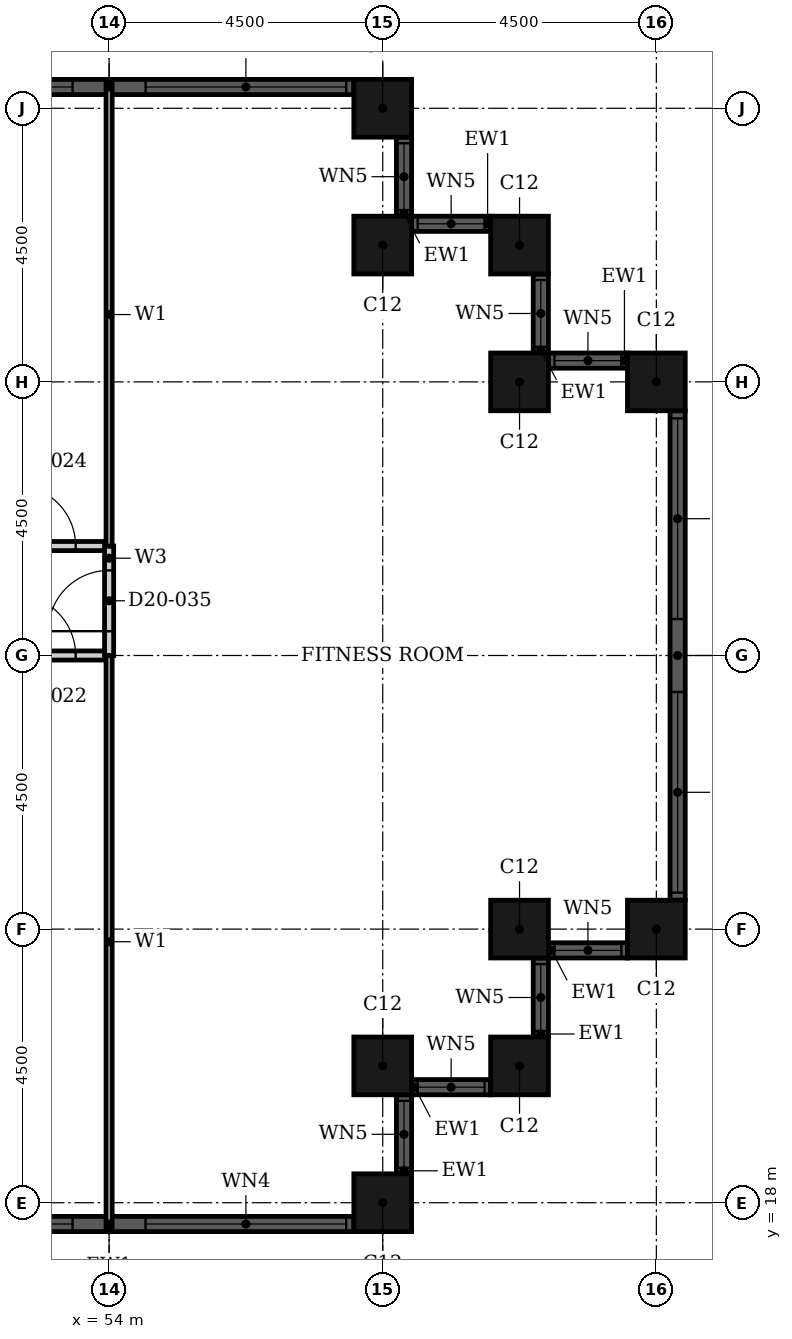
"""IFC4 building model, lengths in metres.
Left out: names, types, materials, properties, quantities, classifications, styles, units other than length and angle.
Written with IfcOpenShell. Run it as: python <this file> out.ifc"""

import sys

from ifc_helpers import new_model, si_unit, direction, frame, frame_2d, origin, origin_2d, place, context, subcontext, project, spatial, rectangle, hollow_rectangle, extrude, element, fill, save


model = new_model("IFC4")
c1 = context("Model", 3, precision=1e-05, world=origin(), true_north=direction((0.0, 1.0)))
c2 = subcontext(c1, "Body", "Model", "MODEL_VIEW")
j1 = project(units=[si_unit("LENGTHUNIT", "METRE"), si_unit("PLANEANGLEUNIT", "RADIAN")], contexts=[c1])
p1 = place(None, origin())
s1 = spatial("IfcSite", under=j1, at=p1, CompositionType="ELEMENT")
p2 = place(p1, origin())
s2 = spatial("IfcBuilding", under=s1, at=p2, CompositionType="ELEMENT")
p3 = place(p2, frame((0.0, 0.0, 85.2)))
s3 = spatial("IfcBuildingStorey", under=s2, at=p3, CompositionType="ELEMENT", Elevation=85.2)
for number, where, z_axis, x_axis in (
    (1, (58.5, 18.0, 0.0), (0.0, 0.0, 1.0), (1.0, 0.0, 0.0)),
    (2, (58.5, 20.25, 0.0), (0.0, 0.0, 1.0), (1.0, 0.0, 0.0)),
    (3, (60.75, 20.25, 0.0), (0.0, 0.0, 1.0), (1.0, 0.0, 0.0)),
    (4, (60.75, 22.5, 0.0), (0.0, 0.0, 1.0), (1.0, 0.0, 0.0)),
    (5, (63.0, 22.5, 0.0), (0.0, 0.0, 1.0), (1.0, 0.0, 0.0)),
    (6, (63.0, 31.5, 0.0), (0.0, 0.0, 1.0), (1.0, 0.0, 0.0)),
    (7, (60.75, 31.5, 0.0), (0.0, 0.0, 1.0), (1.0, 0.0, 0.0)),
    (8, (60.75, 33.75, 0.0), (0.0, 0.0, 1.0), (1.0, 0.0, 0.0)),
    (9, (58.5, 33.75, 0.0), (0.0, 0.0, 1.0), (1.0, 0.0, 0.0)),
    (10, (58.5, 36.0, 0.0), (0.0, 0.0, 1.0), (1.0, 0.0, 0.0)),
):
    element("IfcColumn", number, at=place(p3, frame(where, z_axis=z_axis, x_axis=x_axis)), inside=s3, PredefinedType="COLUMN", context=c2, shape_type="SweptSolid", body=[
        extrude(hollow_rectangle(XDim=0.95, YDim=0.95, WallThickness=0.03, at=origin_2d()), origin(), (0.0, 0.0, 1.0), 3.6),
    ])
p4 = place(p3, frame((49.975, 17.65, 0.0), z_axis=(0.0, 0.0, 1.0), x_axis=(1.0, 0.0, 0.0)))
e11 = element("IfcWall", 11, at=p4, inside=s3, PredefinedType="SOLIDWALL", context=c2, shape_type="SweptSolid", body=[
    extrude(rectangle(XDim=8.05, YDim=0.25, at=frame_2d((4.025, 0.0))), origin(), (0.0, 0.0, 1.0), 3.6),
])
p5 = place(p4, frame((0.125, 0.0, 0.9)))
e12 = element("IfcOpeningElement", 12, at=p5, cuts=e11, PredefinedType="OPENING", context=c2, shape_type="SweptSolid", body=[
    extrude(rectangle(XDim=3.3, YDim=2.08, at=frame_2d((1.65, 1.04))), frame((0.0, 0.135, 0.0), z_axis=(0.0, -1.0, 0.0), x_axis=(1.0, 0.0, 0.0)), (0.0, 0.0, 1.0), 0.27),
])
p6 = place(p4, frame((4.625, 0.0, 0.9)))
e13 = element("IfcOpeningElement", 13, at=p6, cuts=e11, PredefinedType="OPENING", context=c2, shape_type="SweptSolid", body=[
    extrude(rectangle(XDim=3.3, YDim=2.08, at=frame_2d((1.65, 1.04))), frame((0.0, 0.135, 0.0), z_axis=(0.0, -1.0, 0.0), x_axis=(1.0, 0.0, 0.0)), (0.0, 0.0, 1.0), 0.27),
])
p7 = place(p3, frame((58.85, 18.475, 0.0), z_axis=(0.0, 0.0, 1.0), x_axis=(0.0, 1.0, 0.0)))
e14 = element("IfcWall", 14, at=p7, inside=s3, PredefinedType="SOLIDWALL", context=c2, shape_type="SweptSolid", body=[
    extrude(rectangle(XDim=1.3, YDim=0.25, at=frame_2d((0.65, 0.0))), origin(), (0.0, 0.0, 1.0), 3.6),
])
p8 = place(p7, frame((0.1, 0.0, 0.9)))
e15 = element("IfcOpeningElement", 15, at=p8, cuts=e14, PredefinedType="OPENING", context=c2, shape_type="SweptSolid", body=[
    extrude(rectangle(XDim=1.1, YDim=2.08, at=frame_2d((0.55, 1.04))), frame((0.0, 0.135, 0.0), z_axis=(0.0, -1.0, 0.0), x_axis=(1.0, 0.0, 0.0)), (0.0, 0.0, 1.0), 0.27),
])
p9 = place(p3, frame((58.975, 19.9, 0.0), z_axis=(0.0, 0.0, 1.0), x_axis=(1.0, 0.0, 0.0)))
e16 = element("IfcWall", 16, at=p9, inside=s3, PredefinedType="SOLIDWALL", context=c2, shape_type="SweptSolid", body=[
    extrude(rectangle(XDim=1.3, YDim=0.25, at=frame_2d((0.65, 0.0))), origin(), (0.0, 0.0, 1.0), 3.6),
])
p10 = place(p9, frame((0.1, 0.0, 0.9)))
e17 = element("IfcOpeningElement", 17, at=p10, cuts=e16, PredefinedType="OPENING", context=c2, shape_type="SweptSolid", body=[
    extrude(rectangle(XDim=1.1, YDim=2.08, at=frame_2d((0.55, 1.04))), frame((0.0, 0.135, 0.0), z_axis=(0.0, -1.0, 0.0), x_axis=(1.0, 0.0, 0.0)), (0.0, 0.0, 1.0), 0.27),
])
p11 = place(p3, frame((61.1, 20.725, 0.0), z_axis=(0.0, 0.0, 1.0), x_axis=(0.0, 1.0, 0.0)))
e18 = element("IfcWall", 18, at=p11, inside=s3, PredefinedType="SOLIDWALL", context=c2, shape_type="SweptSolid", body=[
    extrude(rectangle(XDim=1.3, YDim=0.25, at=frame_2d((0.65, 0.0))), origin(), (0.0, 0.0, 1.0), 3.6),
])
p12 = place(p11, frame((0.1, 0.0, 0.9)))
e19 = element("IfcOpeningElement", 19, at=p12, cuts=e18, PredefinedType="OPENING", context=c2, shape_type="SweptSolid", body=[
    extrude(rectangle(XDim=1.1, YDim=2.08, at=frame_2d((0.55, 1.04))), frame((0.0, 0.135, 0.0), z_axis=(0.0, -1.0, 0.0), x_axis=(1.0, 0.0, 0.0)), (0.0, 0.0, 1.0), 0.27),
])
p13 = place(p3, frame((61.225, 22.15, 0.0), z_axis=(0.0, 0.0, 1.0), x_axis=(1.0, 0.0, 0.0)))
e20 = element("IfcWall", 20, at=p13, inside=s3, PredefinedType="SOLIDWALL", context=c2, shape_type="SweptSolid", body=[
    extrude(rectangle(XDim=1.3, YDim=0.25, at=frame_2d((0.65, 0.0))), origin(), (0.0, 0.0, 1.0), 3.6),
])
p14 = place(p13, frame((0.1, 0.0, 0.9)))
e21 = element("IfcOpeningElement", 21, at=p14, cuts=e20, PredefinedType="OPENING", context=c2, shape_type="SweptSolid", body=[
    extrude(rectangle(XDim=1.1, YDim=2.08, at=frame_2d((0.55, 1.04))), frame((0.0, 0.135, 0.0), z_axis=(0.0, -1.0, 0.0), x_axis=(1.0, 0.0, 0.0)), (0.0, 0.0, 1.0), 0.27),
])
p15 = place(p3, frame((63.35, 22.975, 0.0), z_axis=(0.0, 0.0, 1.0), x_axis=(0.0, 1.0, 0.0)))
e22 = element("IfcWall", 22, at=p15, inside=s3, PredefinedType="SOLIDWALL", context=c2, shape_type="SweptSolid", body=[
    extrude(rectangle(XDim=8.05, YDim=0.25, at=frame_2d((4.025, 0.0))), origin(), (0.0, 0.0, 1.0), 3.6),
])
p16 = place(p15, frame((0.125, 0.0, 0.9)))
e23 = element("IfcOpeningElement", 23, at=p16, cuts=e22, PredefinedType="OPENING", context=c2, shape_type="SweptSolid", body=[
    extrude(rectangle(XDim=3.3, YDim=2.08, at=frame_2d((1.65, 1.04))), frame((0.0, 0.135, 0.0), z_axis=(0.0, -1.0, 0.0), x_axis=(1.0, 0.0, 0.0)), (0.0, 0.0, 1.0), 0.27),
])
p17 = place(p15, frame((4.625, 0.0, 0.9)))
e24 = element("IfcOpeningElement", 24, at=p17, cuts=e22, PredefinedType="OPENING", context=c2, shape_type="SweptSolid", body=[
    extrude(rectangle(XDim=3.3, YDim=2.08, at=frame_2d((1.65, 1.04))), frame((0.0, 0.135, 0.0), z_axis=(0.0, -1.0, 0.0), x_axis=(1.0, 0.0, 0.0)), (0.0, 0.0, 1.0), 0.27),
])
p18 = place(p3, frame((62.525, 31.85, 0.0), z_axis=(0.0, 0.0, 1.0), x_axis=(-1.0, 0.0, 0.0)))
e25 = element("IfcWall", 25, at=p18, inside=s3, PredefinedType="SOLIDWALL", context=c2, shape_type="SweptSolid", body=[
    extrude(rectangle(XDim=1.3, YDim=0.25, at=frame_2d((0.65, 0.0))), origin(), (0.0, 0.0, 1.0), 3.6),
])
p19 = place(p18, frame((0.1, 0.0, 0.9)))
e26 = element("IfcOpeningElement", 26, at=p19, cuts=e25, PredefinedType="OPENING", context=c2, shape_type="SweptSolid", body=[
    extrude(rectangle(XDim=1.1, YDim=2.08, at=frame_2d((0.55, 1.04))), frame((0.0, 0.135, 0.0), z_axis=(0.0, -1.0, 0.0), x_axis=(1.0, 0.0, 0.0)), (0.0, 0.0, 1.0), 0.27),
])
p20 = place(p3, frame((61.1, 31.975, 0.0), z_axis=(0.0, 0.0, 1.0), x_axis=(0.0, 1.0, 0.0)))
e27 = element("IfcWall", 27, at=p20, inside=s3, PredefinedType="SOLIDWALL", context=c2, shape_type="SweptSolid", body=[
    extrude(rectangle(XDim=1.3, YDim=0.25, at=frame_2d((0.65, 0.0))), origin(), (0.0, 0.0, 1.0), 3.6),
])
p21 = place(p20, frame((0.1, 0.0, 0.9)))
e28 = element("IfcOpeningElement", 28, at=p21, cuts=e27, PredefinedType="OPENING", context=c2, shape_type="SweptSolid", body=[
    extrude(rectangle(XDim=1.1, YDim=2.08, at=frame_2d((0.55, 1.04))), frame((0.0, 0.135, 0.0), z_axis=(0.0, -1.0, 0.0), x_axis=(1.0, 0.0, 0.0)), (0.0, 0.0, 1.0), 0.27),
])
p22 = place(p3, frame((60.275, 34.1, 0.0), z_axis=(0.0, 0.0, 1.0), x_axis=(-1.0, 0.0, 0.0)))
e29 = element("IfcWall", 29, at=p22, inside=s3, PredefinedType="SOLIDWALL", context=c2, shape_type="SweptSolid", body=[
    extrude(rectangle(XDim=1.3, YDim=0.25, at=frame_2d((0.65, 0.0))), origin(), (0.0, 0.0, 1.0), 3.6),
])
p23 = place(p22, frame((0.1, 0.0, 0.9)))
e30 = element("IfcOpeningElement", 30, at=p23, cuts=e29, PredefinedType="OPENING", context=c2, shape_type="SweptSolid", body=[
    extrude(rectangle(XDim=1.1, YDim=2.08, at=frame_2d((0.55, 1.04))), frame((0.0, 0.135, 0.0), z_axis=(0.0, -1.0, 0.0), x_axis=(1.0, 0.0, 0.0)), (0.0, 0.0, 1.0), 0.27),
])
p24 = place(p3, frame((58.85, 34.225, 0.0), z_axis=(0.0, 0.0, 1.0), x_axis=(0.0, 1.0, 0.0)))
e31 = element("IfcWall", 31, at=p24, inside=s3, PredefinedType="SOLIDWALL", context=c2, shape_type="SweptSolid", body=[
    extrude(rectangle(XDim=1.3, YDim=0.25, at=frame_2d((0.65, 0.0))), origin(), (0.0, 0.0, 1.0), 3.6),
])
p25 = place(p24, frame((0.1, 0.0, 0.9)))
e32 = element("IfcOpeningElement", 32, at=p25, cuts=e31, PredefinedType="OPENING", context=c2, shape_type="SweptSolid", body=[
    extrude(rectangle(XDim=1.1, YDim=2.08, at=frame_2d((0.55, 1.04))), frame((0.0, 0.135, 0.0), z_axis=(0.0, -1.0, 0.0), x_axis=(1.0, 0.0, 0.0)), (0.0, 0.0, 1.0), 0.27),
])
p26 = place(p3, frame((58.025, 36.35, 0.0), z_axis=(0.0, 0.0, 1.0), x_axis=(-1.0, 0.0, 0.0)))
e33 = element("IfcWall", 33, at=p26, inside=s3, PredefinedType="SOLIDWALL", context=c2, shape_type="SweptSolid", body=[
    extrude(rectangle(XDim=8.05, YDim=0.25, at=frame_2d((4.025, 0.0))), origin(), (0.0, 0.0, 1.0), 3.6),
])
p27 = place(p26, frame((0.125, 0.0, 0.9)))
e34 = element("IfcOpeningElement", 34, at=p27, cuts=e33, PredefinedType="OPENING", context=c2, shape_type="SweptSolid", body=[
    extrude(rectangle(XDim=3.3, YDim=2.08, at=frame_2d((1.65, 1.04))), frame((0.0, 0.135, 0.0), z_axis=(0.0, -1.0, 0.0), x_axis=(1.0, 0.0, 0.0)), (0.0, 0.0, 1.0), 0.27),
])
p28 = place(p26, frame((4.625, 0.0, 0.9)))
e35 = element("IfcOpeningElement", 35, at=p28, cuts=e33, PredefinedType="OPENING", context=c2, shape_type="SweptSolid", body=[
    extrude(rectangle(XDim=3.3, YDim=2.08, at=frame_2d((1.65, 1.04))), frame((0.0, 0.135, 0.0), z_axis=(0.0, -1.0, 0.0), x_axis=(1.0, 0.0, 0.0)), (0.0, 0.0, 1.0), 0.27),
])
p29 = place(p3, frame((46.8, 27.0, 0.0), z_axis=(0.0, 0.0, 1.0), x_axis=(1.0, 0.0, 0.0)))
e36 = element("IfcWall", 36, at=p29, inside=s3, PredefinedType="PARTITIONING", context=c2, shape_type="SweptSolid", body=[
    extrude(rectangle(XDim=7.2, YDim=0.15, at=frame_2d((3.6, 0.0))), origin(), (0.0, 0.0, 1.0), 2.58),
])
p30 = place(p29, frame((5.65, 0.0, 0.0)))
e37 = element("IfcOpeningElement", 37, at=p30, cuts=e36, PredefinedType="OPENING", context=c2, shape_type="SweptSolid", body=[
    extrude(rectangle(XDim=1.0, YDim=2.1, at=frame_2d((0.5, 1.05))), frame((0.0, 0.085, 0.0), z_axis=(0.0, -1.0, 0.0), x_axis=(1.0, 0.0, 0.0)), (0.0, 0.0, 1.0), 0.17),
])
p31 = place(p3, frame((46.8, 28.8, 0.0), z_axis=(0.0, 0.0, 1.0), x_axis=(1.0, 0.0, 0.0)))
e38 = element("IfcWall", 38, at=p31, inside=s3, PredefinedType="PARTITIONING", context=c2, shape_type="SweptSolid", body=[
    extrude(rectangle(XDim=7.2, YDim=0.15, at=frame_2d((3.6, 0.0))), origin(), (0.0, 0.0, 1.0), 3.3),
])
p32 = place(p31, frame((5.65, 0.0, 0.0)))
e39 = element("IfcOpeningElement", 39, at=p32, cuts=e38, PredefinedType="OPENING", context=c2, shape_type="SweptSolid", body=[
    extrude(rectangle(XDim=1.0, YDim=2.1, at=frame_2d((0.5, 1.05))), frame((0.0, 0.085, 0.0), z_axis=(0.0, -1.0, 0.0), x_axis=(1.0, 0.0, 0.0)), (0.0, 0.0, 1.0), 0.17),
])
p33 = place(p3, frame((54.0, 27.0, 0.0), z_axis=(0.0, 0.0, 1.0), x_axis=(0.0, 1.0, 0.0)))
e40 = element("IfcWall", 40, at=p33, inside=s3, PredefinedType="PARTITIONING", context=c2, shape_type="SweptSolid", body=[
    extrude(rectangle(XDim=1.8, YDim=0.15, at=frame_2d((0.9, 0.0))), origin(), (0.0, 0.0, 1.0), 3.3),
])
p34 = place(p33, frame((0.4, 0.0, 0.0)))
e41 = element("IfcOpeningElement", 41, at=p34, cuts=e40, PredefinedType="OPENING", context=c2, shape_type="SweptSolid", body=[
    extrude(rectangle(XDim=1.0, YDim=2.1, at=frame_2d((0.5, 1.05))), frame((0.0, 0.085, 0.0), z_axis=(0.0, -1.0, 0.0), x_axis=(1.0, 0.0, 0.0)), (0.0, 0.0, 1.0), 0.17),
])
p35 = place(p3, frame((54.0, 28.8, 0.0), z_axis=(0.0, 0.0, 1.0), x_axis=(0.0, 1.0, 0.0)))
e42 = element("IfcWall", 42, at=p35, inside=s3, PredefinedType="PARTITIONING", context=c2, shape_type="SweptSolid", body=[
    extrude(rectangle(XDim=7.615, YDim=0.1, at=frame_2d((3.808, 0.0))), origin(), (0.0, 0.0, 1.0), 3.3),
])
p36 = place(p3, frame((54.0, 17.585, 0.0), z_axis=(0.0, 0.0, 1.0), x_axis=(0.0, 1.0, 0.0)))
e43 = element("IfcWall", 43, at=p36, inside=s3, PredefinedType="PARTITIONING", context=c2, shape_type="SweptSolid", body=[
    extrude(rectangle(XDim=9.415, YDim=0.1, at=frame_2d((4.708, 0.0))), origin(), (0.0, 0.0, 1.0), 3.3),
])
p37 = place(p5, origin())
e44 = element("IfcWindow", 44, at=p37, inside=s3, PartitioningType="SINGLE_PANEL", PredefinedType="WINDOW", context=c2, shape_type="SweptSolid", body=[
    extrude(rectangle(XDim=3.3, YDim=2.08, at=frame_2d((1.65, 1.04))), frame((0.0, 0.03, 0.0), z_axis=(0.0, -1.0, 0.0), x_axis=(1.0, 0.0, 0.0)), (0.0, 0.0, 1.0), 0.06),
])
fill(e12, e44)
p38 = place(p6, origin())
e45 = element("IfcWindow", 45, at=p38, inside=s3, PartitioningType="SINGLE_PANEL", PredefinedType="WINDOW", context=c2, shape_type="SweptSolid", body=[
    extrude(rectangle(XDim=3.3, YDim=2.08, at=frame_2d((1.65, 1.04))), frame((0.0, 0.03, 0.0), z_axis=(0.0, -1.0, 0.0), x_axis=(1.0, 0.0, 0.0)), (0.0, 0.0, 1.0), 0.06),
])
fill(e13, e45)
p39 = place(p8, origin())
e46 = element("IfcWindow", 46, at=p39, inside=s3, PartitioningType="SINGLE_PANEL", PredefinedType="WINDOW", context=c2, shape_type="SweptSolid", body=[
    extrude(rectangle(XDim=1.1, YDim=2.08, at=frame_2d((0.55, 1.04))), frame((0.0, 0.03, 0.0), z_axis=(0.0, -1.0, 0.0), x_axis=(1.0, 0.0, 0.0)), (0.0, 0.0, 1.0), 0.06),
])
fill(e15, e46)
p40 = place(p10, origin())
e47 = element("IfcWindow", 47, at=p40, inside=s3, PartitioningType="SINGLE_PANEL", PredefinedType="WINDOW", context=c2, shape_type="SweptSolid", body=[
    extrude(rectangle(XDim=1.1, YDim=2.08, at=frame_2d((0.55, 1.04))), frame((0.0, 0.03, 0.0), z_axis=(0.0, -1.0, 0.0), x_axis=(1.0, 0.0, 0.0)), (0.0, 0.0, 1.0), 0.06),
])
fill(e17, e47)
p41 = place(p12, origin())
e48 = element("IfcWindow", 48, at=p41, inside=s3, PartitioningType="SINGLE_PANEL", PredefinedType="WINDOW", context=c2, shape_type="SweptSolid", body=[
    extrude(rectangle(XDim=1.1, YDim=2.08, at=frame_2d((0.55, 1.04))), frame((0.0, 0.03, 0.0), z_axis=(0.0, -1.0, 0.0), x_axis=(1.0, 0.0, 0.0)), (0.0, 0.0, 1.0), 0.06),
])
fill(e19, e48)
p42 = place(p14, origin())
e49 = element("IfcWindow", 49, at=p42, inside=s3, PartitioningType="SINGLE_PANEL", PredefinedType="WINDOW", context=c2, shape_type="SweptSolid", body=[
    extrude(rectangle(XDim=1.1, YDim=2.08, at=frame_2d((0.55, 1.04))), frame((0.0, 0.03, 0.0), z_axis=(0.0, -1.0, 0.0), x_axis=(1.0, 0.0, 0.0)), (0.0, 0.0, 1.0), 0.06),
])
fill(e21, e49)
p43 = place(p16, origin())
e50 = element("IfcWindow", 50, at=p43, inside=s3, PartitioningType="SINGLE_PANEL", PredefinedType="WINDOW", context=c2, shape_type="SweptSolid", body=[
    extrude(rectangle(XDim=3.3, YDim=2.08, at=frame_2d((1.65, 1.04))), frame((0.0, 0.03, 0.0), z_axis=(0.0, -1.0, 0.0), x_axis=(1.0, 0.0, 0.0)), (0.0, 0.0, 1.0), 0.06),
])
fill(e23, e50)
p44 = place(p17, origin())
e51 = element("IfcWindow", 51, at=p44, inside=s3, PartitioningType="SINGLE_PANEL", PredefinedType="WINDOW", context=c2, shape_type="SweptSolid", body=[
    extrude(rectangle(XDim=3.3, YDim=2.08, at=frame_2d((1.65, 1.04))), frame((0.0, 0.03, 0.0), z_axis=(0.0, -1.0, 0.0), x_axis=(1.0, 0.0, 0.0)), (0.0, 0.0, 1.0), 0.06),
])
fill(e24, e51)
p45 = place(p19, origin())
e52 = element("IfcWindow", 52, at=p45, inside=s3, PartitioningType="SINGLE_PANEL", PredefinedType="WINDOW", context=c2, shape_type="SweptSolid", body=[
    extrude(rectangle(XDim=1.1, YDim=2.08, at=frame_2d((0.55, 1.04))), frame((0.0, 0.03, 0.0), z_axis=(0.0, -1.0, 0.0), x_axis=(1.0, 0.0, 0.0)), (0.0, 0.0, 1.0), 0.06),
])
fill(e26, e52)
p46 = place(p21, origin())
e53 = element("IfcWindow", 53, at=p46, inside=s3, PartitioningType="SINGLE_PANEL", PredefinedType="WINDOW", context=c2, shape_type="SweptSolid", body=[
    extrude(rectangle(XDim=1.1, YDim=2.08, at=frame_2d((0.55, 1.04))), frame((0.0, 0.03, 0.0), z_axis=(0.0, -1.0, 0.0), x_axis=(1.0, 0.0, 0.0)), (0.0, 0.0, 1.0), 0.06),
])
fill(e28, e53)
p47 = place(p23, origin())
e54 = element("IfcWindow", 54, at=p47, inside=s3, PartitioningType="SINGLE_PANEL", PredefinedType="WINDOW", context=c2, shape_type="SweptSolid", body=[
    extrude(rectangle(XDim=1.1, YDim=2.08, at=frame_2d((0.55, 1.04))), frame((0.0, 0.03, 0.0), z_axis=(0.0, -1.0, 0.0), x_axis=(1.0, 0.0, 0.0)), (0.0, 0.0, 1.0), 0.06),
])
fill(e30, e54)
p48 = place(p25, origin())
e55 = element("IfcWindow", 55, at=p48, inside=s3, PartitioningType="SINGLE_PANEL", PredefinedType="WINDOW", context=c2, shape_type="SweptSolid", body=[
    extrude(rectangle(XDim=1.1, YDim=2.08, at=frame_2d((0.55, 1.04))), frame((0.0, 0.03, 0.0), z_axis=(0.0, -1.0, 0.0), x_axis=(1.0, 0.0, 0.0)), (0.0, 0.0, 1.0), 0.06),
])
fill(e32, e55)
p49 = place(p27, origin())
e56 = element("IfcWindow", 56, at=p49, inside=s3, PartitioningType="SINGLE_PANEL", PredefinedType="WINDOW", context=c2, shape_type="SweptSolid", body=[
    extrude(rectangle(XDim=3.3, YDim=2.08, at=frame_2d((1.65, 1.04))), frame((0.0, 0.03, 0.0), z_axis=(0.0, -1.0, 0.0), x_axis=(1.0, 0.0, 0.0)), (0.0, 0.0, 1.0), 0.06),
])
fill(e34, e56)
p50 = place(p28, origin())
e57 = element("IfcWindow", 57, at=p50, inside=s3, PartitioningType="SINGLE_PANEL", PredefinedType="WINDOW", context=c2, shape_type="SweptSolid", body=[
    extrude(rectangle(XDim=3.3, YDim=2.08, at=frame_2d((1.65, 1.04))), frame((0.0, 0.03, 0.0), z_axis=(0.0, -1.0, 0.0), x_axis=(1.0, 0.0, 0.0)), (0.0, 0.0, 1.0), 0.06),
])
fill(e35, e57)
p51 = place(p30, origin())
e58 = element("IfcDoor", 58, at=p51, inside=s3, OperationType="SINGLE_SWING_RIGHT", PredefinedType="DOOR", context=c2, shape_type="SweptSolid", body=[
    extrude(rectangle(XDim=1.0, YDim=2.1, at=frame_2d((0.5, 1.05))), frame((0.0, 0.025, 0.0), z_axis=(0.0, -1.0, 0.0), x_axis=(1.0, 0.0, 0.0)), (0.0, 0.0, 1.0), 0.05),
])
fill(e37, e58)
p52 = place(p32, origin())
e59 = element("IfcDoor", 59, at=p52, inside=s3, OperationType="SINGLE_SWING_RIGHT", PredefinedType="DOOR", context=c2, shape_type="SweptSolid", body=[
    extrude(rectangle(XDim=1.0, YDim=2.1, at=frame_2d((0.5, 1.05))), frame((0.0, 0.025, 0.0), z_axis=(0.0, -1.0, 0.0), x_axis=(1.0, 0.0, 0.0)), (0.0, 0.0, 1.0), 0.05),
])
fill(e39, e59)
p53 = place(p34, origin())
e60 = element("IfcDoor", 60, at=p53, inside=s3, OperationType="SINGLE_SWING_LEFT", PredefinedType="DOOR", context=c2, shape_type="SweptSolid", body=[
    extrude(rectangle(XDim=1.0, YDim=2.1, at=frame_2d((0.5, 1.05))), frame((0.0, 0.025, 0.0), z_axis=(0.0, -1.0, 0.0), x_axis=(1.0, 0.0, 0.0)), (0.0, 0.0, 1.0), 0.05),
])
fill(e41, e60)
save(model, sys.argv[1])
